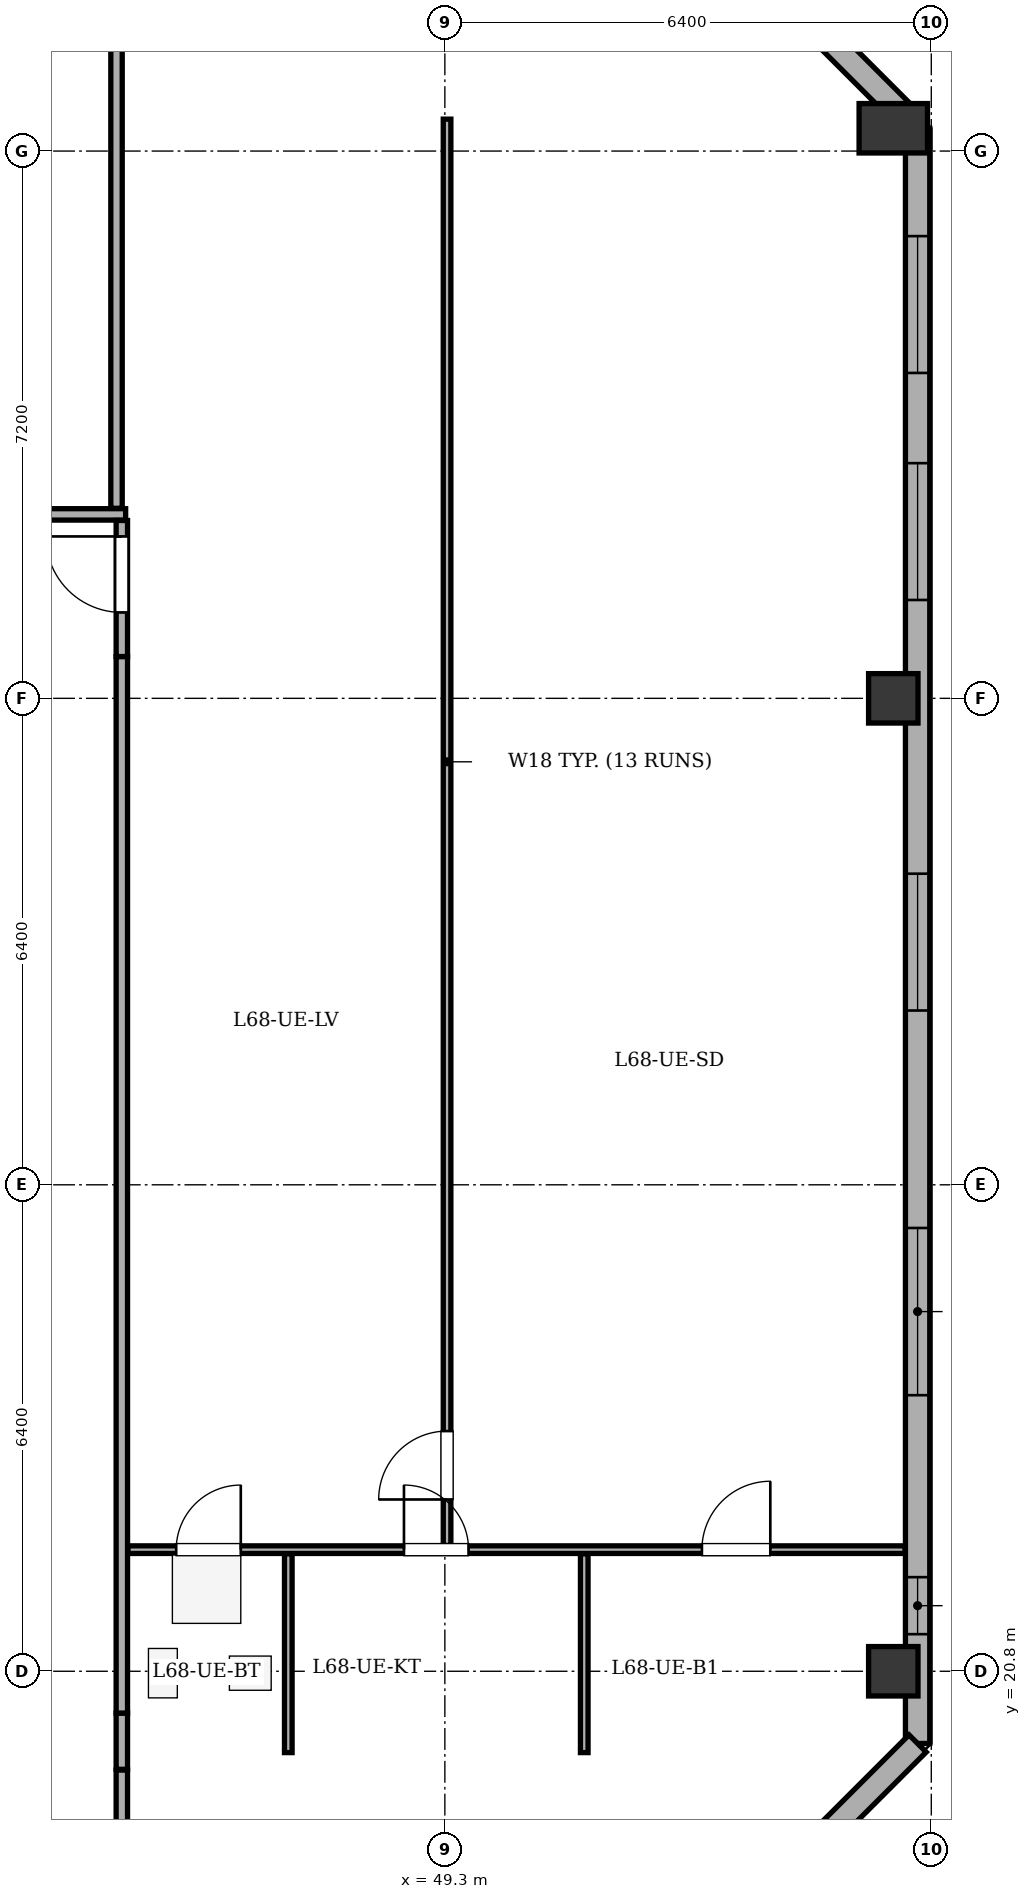
"""IFC4 building model, lengths in metres.
Left out: names, types, materials, properties, quantities, classifications, styles, units other than length and angle.
Written with IfcOpenShell. Run it as: python <this file> out.ifc"""

import sys

from ifc_helpers import new_model, si_unit, direction, frame, frame_2d, origin, origin_2d, place, context, subcontext, project, spatial, rectangle, extrude, element, fill, save


model = new_model("IFC4")
c1 = context("Model", 3, precision=1e-05, world=origin(), true_north=direction((0.0, 1.0)))
c2 = subcontext(c1, "Body", "Model", "MODEL_VIEW")
j1 = project(units=[si_unit("LENGTHUNIT", "METRE"), si_unit("PLANEANGLEUNIT", "RADIAN")], contexts=[c1])
p1 = place(None, origin())
s1 = spatial("IfcSite", under=j1, at=p1, CompositionType="ELEMENT")
p2 = place(p1, origin())
s2 = spatial("IfcBuilding", under=s1, at=p2, CompositionType="ELEMENT")
p3 = place(p2, frame((0.0, 0.0, 258.5)))
s3 = spatial("IfcBuildingStorey", under=s2, at=p3, CompositionType="ELEMENT", Elevation=258.5)
for number, where, z_axis, x_axis in (
    (1, (55.2, 20.8, 0.0), (0.0, 0.0, 1.0), (1.0, 0.0, 0.0)),
    (2, (55.2, 33.6, 0.0), (0.0, 0.0, 1.0), (1.0, 0.0, 0.0)),
):
    element("IfcColumn", number, at=place(p3, frame(where, z_axis=z_axis, x_axis=x_axis)), inside=s3, PredefinedType="COLUMN", context=c2, shape_type="SweptSolid", body=[
        extrude(rectangle(XDim=0.65, YDim=0.65, at=origin_2d()), origin(), (0.0, 0.0, 1.0), 3.4),
    ])
p4 = place(p3, frame((55.2, 41.1, 0.0), z_axis=(0.0, 0.0, 1.0), x_axis=(1.0, 0.0, 0.0)))
e3 = element("IfcColumn", 3, at=p4, inside=s3, PredefinedType="COLUMN", context=c2, shape_type="SweptSolid", body=[
    extrude(rectangle(XDim=0.65, YDim=0.9, at=origin_2d()), origin(), (0.0, 0.0, 1.0), 3.4),
])
p5 = place(p3, frame((51.7, 44.92, 0.0), z_axis=(0.0, 0.0, 1.0), x_axis=(0.70712937715, -0.707084184501, 0.0)))
e4 = element("IfcWall", 4, at=p5, inside=s3, PredefinedType="STANDARD", context=c2, shape_type="SweptSolid", body=[
    extrude(rectangle(XDim=5.402, YDim=0.32, at=frame_2d((2.701, 0.0))), origin(), (0.0, 0.0, 1.0), 2.725),
])
p6 = place(p5, frame((2.001, 0.0, 0.75)))
e5 = element("IfcOpeningElement", 5, at=p6, cuts=e4, PredefinedType="OPENING", context=c2, shape_type="SweptSolid", body=[
    extrude(rectangle(XDim=1.4, YDim=1.65, at=frame_2d((0.7, 0.825))), frame((0.0, 0.17, 0.0), z_axis=(0.0, -1.0, 0.0), x_axis=(1.0, 0.0, 0.0)), (0.0, 0.0, 1.0), 0.34),
])
p7 = place(p3, frame((55.52, 41.1, 0.0), z_axis=(0.0, 0.0, 1.0), x_axis=(0.0, -1.0, 0.0)))
e6 = element("IfcWall", 6, at=p7, inside=s3, PredefinedType="STANDARD", context=c2, shape_type="SweptSolid", body=[
    extrude(rectangle(XDim=21.25, YDim=0.32, at=frame_2d((10.625, 0.0))), origin(), (0.0, 0.0, 1.0), 2.725),
])
p8 = place(p7, frame((1.419, 0.0, 0.75)))
e7 = element("IfcOpeningElement", 7, at=p8, cuts=e6, PredefinedType="OPENING", context=c2, shape_type="SweptSolid", body=[
    extrude(rectangle(XDim=1.8, YDim=1.7, at=frame_2d((0.9, 0.85))), frame((0.0, 0.17, 0.0), z_axis=(0.0, -1.0, 0.0), x_axis=(1.0, 0.0, 0.0)), (0.0, 0.0, 1.0), 0.34),
])
p9 = place(p7, frame((4.406, 0.0, 0.75)))
e8 = element("IfcOpeningElement", 8, at=p9, cuts=e6, PredefinedType="OPENING", context=c2, shape_type="SweptSolid", body=[
    extrude(rectangle(XDim=1.8, YDim=1.7, at=frame_2d((0.9, 0.85))), frame((0.0, 0.17, 0.0), z_axis=(0.0, -1.0, 0.0), x_axis=(1.0, 0.0, 0.0)), (0.0, 0.0, 1.0), 0.34),
])
p10 = place(p7, frame((9.807, 0.0, 0.75)))
e9 = element("IfcOpeningElement", 9, at=p10, cuts=e6, PredefinedType="OPENING", context=c2, shape_type="SweptSolid", body=[
    extrude(rectangle(XDim=1.8, YDim=1.7, at=frame_2d((0.9, 0.85))), frame((0.0, 0.17, 0.0), z_axis=(0.0, -1.0, 0.0), x_axis=(1.0, 0.0, 0.0)), (0.0, 0.0, 1.0), 0.34),
])
p11 = place(p7, frame((14.468, 0.0, 0.75)))
e10 = element("IfcOpeningElement", 10, at=p11, cuts=e6, PredefinedType="OPENING", context=c2, shape_type="SweptSolid", body=[
    extrude(rectangle(XDim=2.2, YDim=1.7, at=frame_2d((1.1, 0.85))), frame((0.0, 0.17, 0.0), z_axis=(0.0, -1.0, 0.0), x_axis=(1.0, 0.0, 0.0)), (0.0, 0.0, 1.0), 0.34),
])
p12 = place(p7, frame((19.062, 0.0, 0.75)))
e11 = element("IfcOpeningElement", 11, at=p12, cuts=e6, PredefinedType="OPENING", context=c2, shape_type="SweptSolid", body=[
    extrude(rectangle(XDim=0.75, YDim=1.45, at=frame_2d((0.375, 0.725))), frame((0.0, 0.17, 0.0), z_axis=(0.0, -1.0, 0.0), x_axis=(1.0, 0.0, 0.0)), (0.0, 0.0, 1.0), 0.34),
])
p13 = place(p3, frame((55.52, 19.85, 0.0), z_axis=(0.0, 0.0, 1.0), x_axis=(-0.707106781187, -0.707106781187, 0.0)))
e12 = element("IfcWall", 12, at=p13, inside=s3, PredefinedType="STANDARD", context=c2, shape_type="SweptSolid", body=[
    extrude(rectangle(XDim=5.402, YDim=0.32, at=frame_2d((2.701, 0.0))), origin(), (0.0, 0.0, 1.0), 2.725),
])
p14 = place(p13, frame((2.001, 0.0, 0.75)))
e13 = element("IfcOpeningElement", 13, at=p14, cuts=e12, PredefinedType="OPENING", context=c2, shape_type="SweptSolid", body=[
    extrude(rectangle(XDim=1.4, YDim=1.65, at=frame_2d((0.7, 0.825))), frame((0.0, 0.17, 0.0), z_axis=(0.0, -1.0, 0.0), x_axis=(1.0, 0.0, 0.0)), (0.0, 0.0, 1.0), 0.34),
])
p15 = place(p3, frame((14.58, 36.02, 0.0), z_axis=(0.0, 0.0, 1.0), x_axis=(1.0, 0.0, 0.0)))
e14 = element("IfcWall", 14, at=p15, inside=s3, PredefinedType="PARTITIONING", context=c2, shape_type="SweptSolid", body=[
    extrude(rectangle(XDim=30.52, YDim=0.15, at=frame_2d((15.26, 0.0))), origin(), (0.0, 0.0, 1.0), 3.1),
])
p16 = place(p15, frame((3.253, 0.0, 0.0)))
e15 = element("IfcOpeningElement", 15, at=p16, cuts=e14, PredefinedType="OPENING", context=c2, shape_type="SweptSolid", body=[
    extrude(rectangle(XDim=1.0, YDim=2.1, at=frame_2d((0.5, 1.05))), frame((0.0, 0.085, 0.0), z_axis=(0.0, -1.0, 0.0), x_axis=(1.0, 0.0, 0.0)), (0.0, 0.0, 1.0), 0.17),
])
p17 = place(p15, frame((10.823, 0.0, 0.0)))
e16 = element("IfcOpeningElement", 16, at=p17, cuts=e14, PredefinedType="OPENING", context=c2, shape_type="SweptSolid", body=[
    extrude(rectangle(XDim=1.0, YDim=2.1, at=frame_2d((0.5, 1.05))), frame((0.0, 0.085, 0.0), z_axis=(0.0, -1.0, 0.0), x_axis=(1.0, 0.0, 0.0)), (0.0, 0.0, 1.0), 0.17),
])
p18 = place(p15, frame((18.697, 0.0, 0.0)))
e17 = element("IfcOpeningElement", 17, at=p18, cuts=e14, PredefinedType="OPENING", context=c2, shape_type="SweptSolid", body=[
    extrude(rectangle(XDim=1.0, YDim=2.1, at=frame_2d((0.5, 1.05))), frame((0.0, 0.085, 0.0), z_axis=(0.0, -1.0, 0.0), x_axis=(1.0, 0.0, 0.0)), (0.0, 0.0, 1.0), 0.17),
])
p19 = place(p15, frame((26.267, 0.0, 0.0)))
e18 = element("IfcOpeningElement", 18, at=p19, cuts=e14, PredefinedType="OPENING", context=c2, shape_type="SweptSolid", body=[
    extrude(rectangle(XDim=1.0, YDim=2.1, at=frame_2d((0.5, 1.05))), frame((0.0, 0.085, 0.0), z_axis=(0.0, -1.0, 0.0), x_axis=(1.0, 0.0, 0.0)), (0.0, 0.0, 1.0), 0.17),
])
p20 = place(p3, frame((44.98, 36.1, 0.0), z_axis=(0.0, 0.0, 1.0), x_axis=(0.0, 1.0, 0.0)))
e19 = element("IfcWall", 19, at=p20, inside=s3, PredefinedType="PARTITIONING", context=c2, shape_type="SweptSolid", body=[
    extrude(rectangle(XDim=8.655, YDim=0.15, at=frame_2d((4.327, 0.0))), origin(), (0.0, 0.0, 1.0), 2.725),
])
p21 = place(p3, frame((45.05, 19.5, 0.0), z_axis=(0.0, 0.0, 1.0), x_axis=(0.0, -1.0, 0.0)))
e20 = element("IfcWall", 20, at=p21, inside=s3, PredefinedType="PARTITIONING", context=c2, shape_type="SweptSolid", body=[
    extrude(rectangle(XDim=0.96, YDim=0.15, at=frame_2d((0.48, 0.0))), origin(), (0.0, 0.0, 1.0), 2.725),
])
p22 = place(p3, frame((45.05, 19.51, 0.0), z_axis=(0.0, 0.0, 1.0), x_axis=(0.0, 1.0, 0.0)))
e21 = element("IfcWall", 21, at=p22, inside=s3, PredefinedType="PARTITIONING", context=c2, shape_type="SweptSolid", body=[
    extrude(rectangle(XDim=0.74, YDim=0.15, at=frame_2d((0.37, 0.0))), origin(), (0.0, 0.0, 1.0), 2.725),
])
p23 = place(p3, frame((45.05, 20.25, 0.0), z_axis=(0.0, 0.0, 1.0), x_axis=(0.0, 1.0, 0.0)))
e22 = element("IfcWall", 22, at=p23, inside=s3, PredefinedType="PARTITIONING", context=c2, shape_type="SweptSolid", body=[
    extrude(rectangle(XDim=13.9, YDim=0.15, at=frame_2d((6.95, 0.0))), origin(), (0.0, 0.0, 1.0), 2.725),
])
p24 = place(p3, frame((45.05, 34.15, 0.0), z_axis=(0.0, 0.0, 1.0), x_axis=(0.0, 1.0, 0.0)))
e23 = element("IfcWall", 23, at=p24, inside=s3, PredefinedType="PARTITIONING", context=c2, shape_type="SweptSolid", body=[
    extrude(rectangle(XDim=1.79, YDim=0.15, at=frame_2d((0.895, 0.0))), origin(), (0.0, 0.0, 1.0), 2.725),
])
p25 = place(p24, frame((0.58, 0.0, 0.0)))
e24 = element("IfcOpeningElement", 24, at=p25, cuts=e23, PredefinedType="OPENING", context=c2, shape_type="SweptSolid", body=[
    extrude(rectangle(XDim=1.0, YDim=2.1, at=frame_2d((0.5, 1.05))), frame((0.0, 0.085, 0.0), z_axis=(0.0, -1.0, 0.0), x_axis=(1.0, 0.0, 0.0)), (0.0, 0.0, 1.0), 0.17),
])
p26 = place(p3, frame((45.13, 22.4, 0.0), z_axis=(0.0, 0.0, 1.0), x_axis=(1.0, 0.0, 0.0)))
e25 = element("IfcWall", 25, at=p26, inside=s3, PredefinedType="PARTITIONING", context=c2, shape_type="SweptSolid", body=[
    extrude(rectangle(XDim=10.225, YDim=0.1, at=frame_2d((5.113, 0.0))), origin(), (0.0, 0.0, 1.0), 3.1),
])
p27 = place(p26, frame((0.635, 0.0, 0.0)))
e26 = element("IfcOpeningElement", 26, at=p27, cuts=e25, PredefinedType="OPENING", context=c2, shape_type="SweptSolid", body=[
    extrude(rectangle(XDim=0.85, YDim=2.05, at=frame_2d((0.425, 1.025))), frame((0.0, 0.06, 0.0), z_axis=(0.0, -1.0, 0.0), x_axis=(1.0, 0.0, 0.0)), (0.0, 0.0, 1.0), 0.12),
])
p28 = place(p26, frame((3.632, 0.0, 0.0)))
e27 = element("IfcOpeningElement", 27, at=p28, cuts=e25, PredefinedType="OPENING", context=c2, shape_type="SweptSolid", body=[
    extrude(rectangle(XDim=0.85, YDim=2.05, at=frame_2d((0.425, 1.025))), frame((0.0, 0.06, 0.0), z_axis=(0.0, -1.0, 0.0), x_axis=(1.0, 0.0, 0.0)), (0.0, 0.0, 1.0), 0.12),
])
p29 = place(p26, frame((7.552, 0.0, 0.0)))
e28 = element("IfcOpeningElement", 28, at=p29, cuts=e25, PredefinedType="OPENING", context=c2, shape_type="SweptSolid", body=[
    extrude(rectangle(XDim=0.9, YDim=2.05, at=frame_2d((0.45, 1.025))), frame((0.0, 0.06, 0.0), z_axis=(0.0, -1.0, 0.0), x_axis=(1.0, 0.0, 0.0)), (0.0, 0.0, 1.0), 0.12),
])
p30 = place(p3, frame((49.329, 22.455, 0.0), z_axis=(0.0, 0.0, 1.0), x_axis=(0.0, 1.0, 0.0)))
e29 = element("IfcWall", 29, at=p30, inside=s3, PredefinedType="PARTITIONING", context=c2, shape_type="SweptSolid", body=[
    extrude(rectangle(XDim=18.765, YDim=0.1, at=frame_2d((9.382, 0.0))), origin(), (0.0, 0.0, 1.0), 2.725),
])
p31 = place(p30, frame((0.605, 0.0, 0.0)))
e30 = element("IfcOpeningElement", 30, at=p31, cuts=e29, PredefinedType="OPENING", context=c2, shape_type="SweptSolid", body=[
    extrude(rectangle(XDim=0.9, YDim=2.05, at=frame_2d((0.45, 1.025))), frame((0.0, 0.06, 0.0), z_axis=(0.0, -1.0, 0.0), x_axis=(1.0, 0.0, 0.0)), (0.0, 0.0, 1.0), 0.12),
])
p32 = place(p3, frame((47.24, 19.73, 0.0), z_axis=(0.0, 0.0, 1.0), x_axis=(0.0, 1.0, 0.0)))
e31 = element("IfcWall", 31, at=p32, inside=s3, PredefinedType="PARTITIONING", context=c2, shape_type="SweptSolid", body=[
    extrude(rectangle(XDim=2.615, YDim=0.1, at=frame_2d((1.308, 0.0))), origin(), (0.0, 0.0, 1.0), 2.725),
])
p33 = place(p3, frame((51.134, 19.73, 0.0), z_axis=(0.0, 0.0, 1.0), x_axis=(0.0, 1.0, 0.0)))
e32 = element("IfcWall", 32, at=p33, inside=s3, PredefinedType="PARTITIONING", context=c2, shape_type="SweptSolid", body=[
    extrude(rectangle(XDim=2.615, YDim=0.1, at=frame_2d((1.308, 0.0))), origin(), (0.0, 0.0, 1.0), 3.1),
])
p34 = place(p8, origin())
e33 = element("IfcWindow", 33, at=p34, inside=s3, PartitioningType="SINGLE_PANEL", PredefinedType="WINDOW", context=c2, shape_type="SweptSolid", body=[
    extrude(rectangle(XDim=1.8, YDim=1.7, at=frame_2d((0.9, 0.85))), frame((0.0, -0.01, 0.0), z_axis=(0.0, -1.0, 0.0), x_axis=(1.0, 0.0, 0.0)), (0.0, 0.0, 1.0), 0.06),
])
fill(e7, e33)
p35 = place(p9, origin())
e34 = element("IfcWindow", 34, at=p35, inside=s3, PartitioningType="SINGLE_PANEL", PredefinedType="WINDOW", context=c2, shape_type="SweptSolid", body=[
    extrude(rectangle(XDim=1.8, YDim=1.7, at=frame_2d((0.9, 0.85))), frame((0.0, -0.01, 0.0), z_axis=(0.0, -1.0, 0.0), x_axis=(1.0, 0.0, 0.0)), (0.0, 0.0, 1.0), 0.06),
])
fill(e8, e34)
p36 = place(p10, origin())
e35 = element("IfcWindow", 35, at=p36, inside=s3, PartitioningType="SINGLE_PANEL", PredefinedType="WINDOW", context=c2, shape_type="SweptSolid", body=[
    extrude(rectangle(XDim=1.8, YDim=1.7, at=frame_2d((0.9, 0.85))), frame((0.0, -0.01, 0.0), z_axis=(0.0, -1.0, 0.0), x_axis=(1.0, 0.0, 0.0)), (0.0, 0.0, 1.0), 0.06),
])
fill(e9, e35)
p37 = place(p11, origin())
e36 = element("IfcWindow", 36, at=p37, inside=s3, PartitioningType="SINGLE_PANEL", PredefinedType="WINDOW", context=c2, shape_type="SweptSolid", body=[
    extrude(rectangle(XDim=2.2, YDim=1.7, at=frame_2d((1.1, 0.85))), frame((0.0, -0.01, 0.0), z_axis=(0.0, -1.0, 0.0), x_axis=(1.0, 0.0, 0.0)), (0.0, 0.0, 1.0), 0.06),
])
fill(e10, e36)
p38 = place(p12, origin())
e37 = element("IfcWindow", 37, at=p38, inside=s3, PartitioningType="SINGLE_PANEL", PredefinedType="WINDOW", context=c2, shape_type="SweptSolid", body=[
    extrude(rectangle(XDim=0.75, YDim=1.45, at=frame_2d((0.375, 0.725))), frame((0.0, -0.01, 0.0), z_axis=(0.0, -1.0, 0.0), x_axis=(1.0, 0.0, 0.0)), (0.0, 0.0, 1.0), 0.06),
])
fill(e11, e37)
p39 = place(p25, origin())
e38 = element("IfcDoor", 38, at=p39, inside=s3, OperationType="SINGLE_SWING_RIGHT", PredefinedType="DOOR", context=c2, shape_type="SweptSolid", body=[
    extrude(rectangle(XDim=1.0, YDim=2.1, at=frame_2d((0.5, 1.05))), frame((0.0, 0.025, 0.0), z_axis=(0.0, -1.0, 0.0), x_axis=(1.0, 0.0, 0.0)), (0.0, 0.0, 1.0), 0.05),
])
fill(e24, e38)
p40 = place(p31, origin())
e39 = element("IfcDoor", 39, at=p40, inside=s3, OperationType="SINGLE_SWING_LEFT", PredefinedType="DOOR", context=c2, shape_type="SweptSolid", body=[
    extrude(rectangle(XDim=0.9, YDim=2.05, at=frame_2d((0.45, 1.025))), frame((0.0, 0.025, 0.0), z_axis=(0.0, -1.0, 0.0), x_axis=(1.0, 0.0, 0.0)), (0.0, 0.0, 1.0), 0.05),
])
fill(e30, e39)
p41 = place(p27, origin())
e40 = element("IfcDoor", 40, at=p41, inside=s3, OperationType="SINGLE_SWING_RIGHT", PredefinedType="DOOR", context=c2, shape_type="SweptSolid", body=[
    extrude(rectangle(XDim=0.85, YDim=2.05, at=frame_2d((0.425, 1.025))), frame((0.0, 0.025, 0.0), z_axis=(0.0, -1.0, 0.0), x_axis=(1.0, 0.0, 0.0)), (0.0, 0.0, 1.0), 0.05),
])
fill(e26, e40)
p42 = place(p28, origin())
e41 = element("IfcDoor", 41, at=p42, inside=s3, OperationType="SINGLE_SWING_LEFT", PredefinedType="DOOR", context=c2, shape_type="SweptSolid", body=[
    extrude(rectangle(XDim=0.85, YDim=2.05, at=frame_2d((0.425, 1.025))), frame((0.0, 0.025, 0.0), z_axis=(0.0, -1.0, 0.0), x_axis=(1.0, 0.0, 0.0)), (0.0, 0.0, 1.0), 0.05),
])
fill(e27, e41)
p43 = place(p29, origin())
e42 = element("IfcDoor", 42, at=p43, inside=s3, OperationType="SINGLE_SWING_RIGHT", PredefinedType="DOOR", context=c2, shape_type="SweptSolid", body=[
    extrude(rectangle(XDim=0.9, YDim=2.05, at=frame_2d((0.45, 1.025))), frame((0.0, 0.025, 0.0), z_axis=(0.0, -1.0, 0.0), x_axis=(1.0, 0.0, 0.0)), (0.0, 0.0, 1.0), 0.05),
])
fill(e28, e42)
save(model, sys.argv[1])
